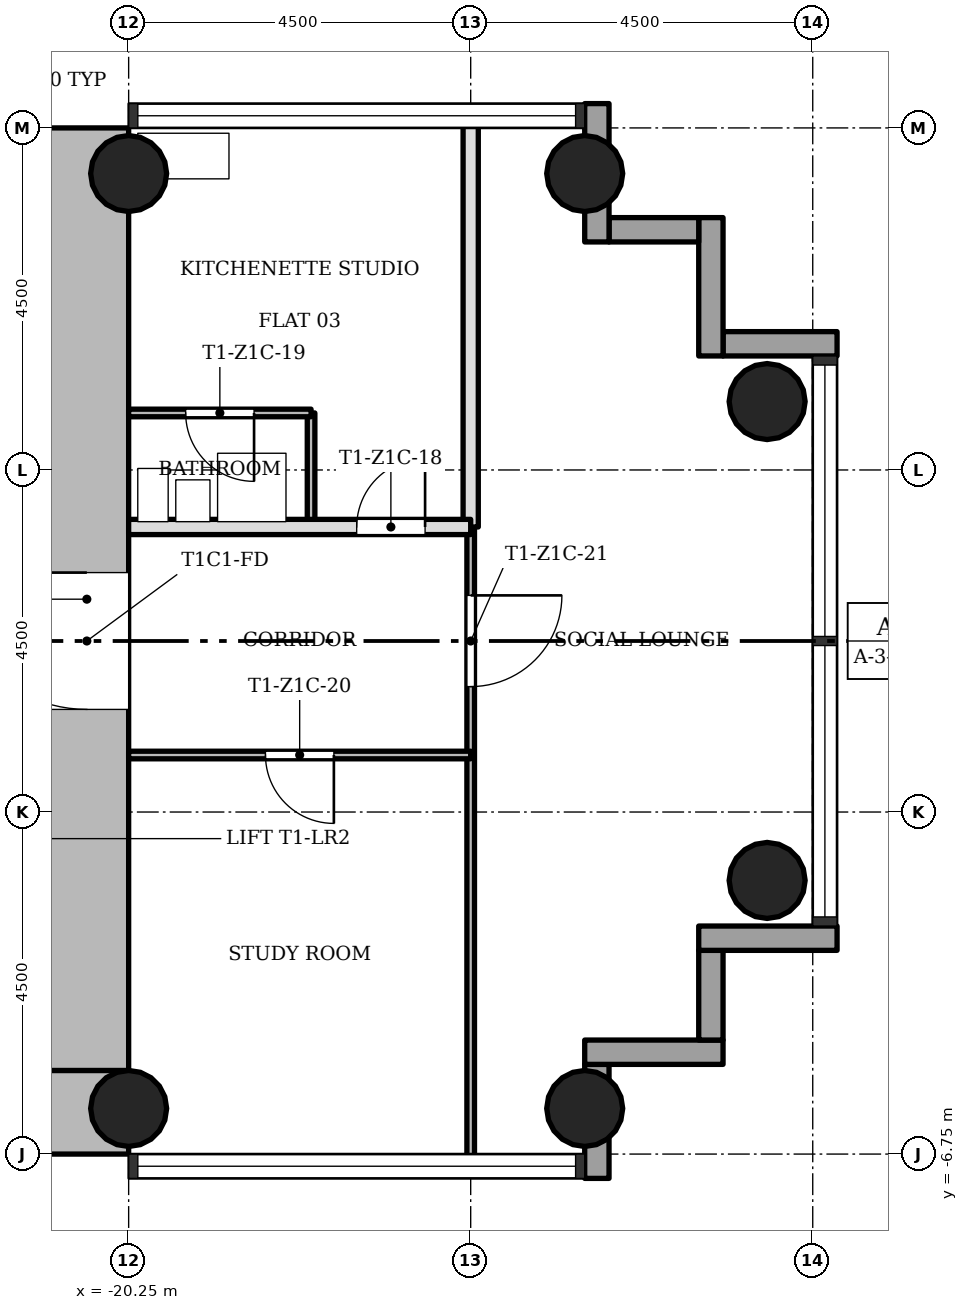
"""IFC4 building model, lengths in metres.
Left out: names, types, materials, properties, quantities, classifications, styles, units other than length and angle.
Written with IfcOpenShell. Run it as: python <this file> out.ifc"""

import sys

from ifc_helpers import new_model, si_unit, direction, frame, frame_2d, origin, origin_2d, place, context, subcontext, project, spatial, rectangle, hollow_circle, extrude, element, fill, save


model = new_model("IFC4")
c1 = context("Model", 3, precision=1e-05, world=origin(), true_north=direction((0.0, 1.0)))
c2 = subcontext(c1, "Body", "Model", "MODEL_VIEW")
j1 = project(units=[si_unit("LENGTHUNIT", "METRE"), si_unit("PLANEANGLEUNIT", "RADIAN")], contexts=[c1])
p1 = place(None, origin())
s1 = spatial("IfcSite", under=j1, at=p1, CompositionType="ELEMENT")
p2 = place(p1, origin())
s2 = spatial("IfcBuilding", under=s1, at=p2, CompositionType="ELEMENT")
p3 = place(p2, frame((0.0, 0.0, 48.3)))
s3 = spatial("IfcBuildingStorey", under=s2, at=p3, CompositionType="ELEMENT", Elevation=48.3)
p4 = place(p3, frame((-28.15, -6.2, 0.0), z_axis=(0.0, 0.0, 1.0), x_axis=(1.0, 0.0, 0.0)))
e1 = element("IfcWall", 1, at=p4, inside=s3, PredefinedType="SHEAR", context=c2, shape_type="SweptSolid", body=[
    extrude(rectangle(XDim=7.9, YDim=1.1, at=frame_2d((3.95, 0.0))), origin(), (0.0, 0.0, 1.0), 3.4),
])
p5 = place(p3, frame((-20.8, -5.65, 0.0), z_axis=(0.0, 0.0, 1.0), x_axis=(0.0, 1.0, 0.0)))
e2 = element("IfcWall", 2, at=p5, inside=s3, PredefinedType="SHEAR", context=c2, shape_type="SweptSolid", body=[
    extrude(rectangle(XDim=12.4, YDim=1.1, at=frame_2d((6.2, 0.0))), origin(), (0.0, 0.0, 1.0), 3.4),
])
p6 = place(p5, frame((4.75, 0.0, 0.0)))
e3 = element("IfcOpeningElement", 3, at=p6, cuts=e2, PredefinedType="OPENING", context=c2, shape_type="SweptSolid", body=[
    extrude(rectangle(XDim=1.8, YDim=2.1, at=frame_2d((0.9, 1.05))), frame((0.0, 0.56, 0.0), z_axis=(0.0, -1.0, 0.0), x_axis=(1.0, 0.0, 0.0)), (0.0, 0.0, 1.0), 1.12),
])
for number, where, z_axis, x_axis in (
    (4, (-20.25, -6.15, 0.0), (0.0, 0.0, 1.0), (1.0, 0.0, 0.0)),
    (5, (-20.25, 6.15, 0.0), (0.0, 0.0, 1.0), (1.0, 0.0, 0.0)),
    (6, (-14.25, -6.15, 0.0), (0.0, 0.0, 1.0), (1.0, 0.0, 0.0)),
    (7, (-14.25, 6.15, 0.0), (0.0, 0.0, 1.0), (1.0, 0.0, 0.0)),
    (8, (-11.85, -3.15, 0.0), (0.0, 0.0, 1.0), (1.0, 0.0, 0.0)),
    (9, (-11.85, 3.15, 0.0), (0.0, 0.0, 1.0), (1.0, 0.0, 0.0)),
):
    element("IfcColumn", number, at=place(p3, frame(where, z_axis=z_axis, x_axis=x_axis)), inside=s3, PredefinedType="COLUMN", context=c2, shape_type="SweptSolid", body=[
        extrude(hollow_circle(Radius=0.5, WallThickness=0.036, at=origin_2d()), origin(), (0.0, 0.0, 1.0), 3.4),
    ])
p7 = place(p3, frame((-14.09, -7.07, -0.3), z_axis=(0.0, 0.0, 1.0), x_axis=(0.0, 1.0, 0.0)))
e10 = element("IfcWall", 10, at=p7, inside=s3, PredefinedType="STANDARD", context=c2, shape_type="SweptSolid", body=[
    extrude(rectangle(XDim=1.5, YDim=0.32, at=frame_2d((0.75, 0.0))), origin(), (0.0, 0.0, 1.0), 3.4),
])
p8 = place(p3, frame((-14.25, -5.41, -0.3), z_axis=(0.0, 0.0, 1.0), x_axis=(1.0, 0.0, 0.0)))
e11 = element("IfcWall", 11, at=p8, inside=s3, PredefinedType="STANDARD", context=c2, shape_type="SweptSolid", body=[
    extrude(rectangle(XDim=1.82, YDim=0.32, at=frame_2d((0.91, 0.0))), origin(), (0.0, 0.0, 1.0), 3.4),
])
p9 = place(p3, frame((-12.59, -5.25, -0.3), z_axis=(0.0, 0.0, 1.0), x_axis=(0.0, 1.0, 0.0)))
e12 = element("IfcWall", 12, at=p9, inside=s3, PredefinedType="STANDARD", context=c2, shape_type="SweptSolid", body=[
    extrude(rectangle(XDim=1.18, YDim=0.32, at=frame_2d((0.59, 0.0))), origin(), (0.0, 0.0, 1.0), 3.4),
])
p10 = place(p3, frame((-12.75, -3.91, -0.3), z_axis=(0.0, 0.0, 1.0), x_axis=(1.0, 0.0, 0.0)))
e13 = element("IfcWall", 13, at=p10, inside=s3, PredefinedType="STANDARD", context=c2, shape_type="SweptSolid", body=[
    extrude(rectangle(XDim=1.82, YDim=0.32, at=frame_2d((0.91, 0.0))), origin(), (0.0, 0.0, 1.0), 3.4),
])
p11 = place(p3, frame((-10.93, 3.91, -0.3), z_axis=(0.0, 0.0, 1.0), x_axis=(-1.0, 0.0, 0.0)))
e14 = element("IfcWall", 14, at=p11, inside=s3, PredefinedType="STANDARD", context=c2, shape_type="SweptSolid", body=[
    extrude(rectangle(XDim=1.5, YDim=0.32, at=frame_2d((0.75, 0.0))), origin(), (0.0, 0.0, 1.0), 3.4),
])
p12 = place(p3, frame((-12.59, 3.75, -0.3), z_axis=(0.0, 0.0, 1.0), x_axis=(0.0, 1.0, 0.0)))
e15 = element("IfcWall", 15, at=p12, inside=s3, PredefinedType="STANDARD", context=c2, shape_type="SweptSolid", body=[
    extrude(rectangle(XDim=1.82, YDim=0.32, at=frame_2d((0.91, 0.0))), origin(), (0.0, 0.0, 1.0), 3.4),
])
p13 = place(p3, frame((-12.75, 5.41, -0.3), z_axis=(0.0, 0.0, 1.0), x_axis=(-1.0, 0.0, 0.0)))
e16 = element("IfcWall", 16, at=p13, inside=s3, PredefinedType="STANDARD", context=c2, shape_type="SweptSolid", body=[
    extrude(rectangle(XDim=1.18, YDim=0.32, at=frame_2d((0.59, 0.0))), origin(), (0.0, 0.0, 1.0), 3.4),
])
p14 = place(p3, frame((-14.09, 5.25, -0.3), z_axis=(0.0, 0.0, 1.0), x_axis=(0.0, 1.0, 0.0)))
e17 = element("IfcWall", 17, at=p14, inside=s3, PredefinedType="STANDARD", context=c2, shape_type="SweptSolid", body=[
    extrude(rectangle(XDim=1.82, YDim=0.32, at=frame_2d((0.91, 0.0))), origin(), (0.0, 0.0, 1.0), 3.4),
])
p15 = place(p3, frame((-17.85, 1.5, 0.0), z_axis=(0.0, 0.0, 1.0), x_axis=(0.0, 1.0, 0.0)))
e18 = element("IfcWall", 18, at=p15, inside=s3, PredefinedType="PARTITIONING", context=c2, shape_type="SweptSolid", body=[
    extrude(rectangle(XDim=1.5, YDim=0.1, at=frame_2d((0.75, 0.0))), origin(), (0.0, 0.0, 1.0), 3.0),
])
p16 = place(p3, frame((-15.75, -6.85, 0.0), z_axis=(0.0, 0.0, 1.0), x_axis=(0.0, 1.0, 0.0)))
e19 = element("IfcWall", 19, at=p16, inside=s3, PredefinedType="PARTITIONING", context=c2, shape_type="SweptSolid", body=[
    extrude(rectangle(XDim=8.35, YDim=0.1, at=frame_2d((4.175, 0.0))), origin(), (0.0, 0.0, 1.0), 3.0),
])
p17 = place(p16, frame((6.25, 0.0, 0.0)))
e20 = element("IfcOpeningElement", 20, at=p17, cuts=e19, PredefinedType="OPENING", context=c2, shape_type="SweptSolid", body=[
    extrude(rectangle(XDim=1.2, YDim=2.1, at=frame_2d((0.6, 1.05))), frame((0.0, 0.06, 0.0), z_axis=(0.0, -1.0, 0.0), x_axis=(1.0, 0.0, 0.0)), (0.0, 0.0, 1.0), 0.12),
])
p18 = place(p3, frame((-15.75, 1.5, 0.0), z_axis=(0.0, 0.0, 1.0), x_axis=(0.0, 1.0, 0.0)))
e21 = element("IfcWall", 21, at=p18, inside=s3, PredefinedType="SOLIDWALL", context=c2, shape_type="SweptSolid", body=[
    extrude(rectangle(XDim=5.35, YDim=0.2, at=frame_2d((2.675, 0.0))), origin(), (0.0, 0.0, 1.0), 3.0),
])
p19 = place(p3, frame((-20.25, -1.5, 0.0), z_axis=(0.0, 0.0, 1.0), x_axis=(1.0, 0.0, 0.0)))
e22 = element("IfcWall", 22, at=p19, inside=s3, PredefinedType="PARTITIONING", context=c2, shape_type="SweptSolid", body=[
    extrude(rectangle(XDim=4.5, YDim=0.1, at=frame_2d((2.25, 0.0))), origin(), (0.0, 0.0, 1.0), 3.0),
])
p20 = place(p19, frame((1.8, 0.0, 0.0)))
e23 = element("IfcOpeningElement", 23, at=p20, cuts=e22, PredefinedType="OPENING", context=c2, shape_type="SweptSolid", body=[
    extrude(rectangle(XDim=0.9, YDim=2.1, at=frame_2d((0.45, 1.05))), frame((0.0, 0.06, 0.0), z_axis=(0.0, -1.0, 0.0), x_axis=(1.0, 0.0, 0.0)), (0.0, 0.0, 1.0), 0.12),
])
p21 = place(p3, frame((-20.25, 1.5, 0.0), z_axis=(0.0, 0.0, 1.0), x_axis=(1.0, 0.0, 0.0)))
e24 = element("IfcWall", 24, at=p21, inside=s3, PredefinedType="SOLIDWALL", context=c2, shape_type="SweptSolid", body=[
    extrude(rectangle(XDim=4.5, YDim=0.2, at=frame_2d((2.25, 0.0))), origin(), (0.0, 0.0, 1.0), 3.0),
])
p22 = place(p21, frame((3.0, 0.0, 0.0)))
e25 = element("IfcOpeningElement", 25, at=p22, cuts=e24, PredefinedType="OPENING", context=c2, shape_type="SweptSolid", body=[
    extrude(rectangle(XDim=0.9, YDim=2.1, at=frame_2d((0.45, 1.05))), frame((0.0, 0.11, 0.0), z_axis=(0.0, -1.0, 0.0), x_axis=(1.0, 0.0, 0.0)), (0.0, 0.0, 1.0), 0.22),
])
p23 = place(p3, frame((-20.25, 3.0, 0.0), z_axis=(0.0, 0.0, 1.0), x_axis=(1.0, 0.0, 0.0)))
e26 = element("IfcWall", 26, at=p23, inside=s3, PredefinedType="PARTITIONING", context=c2, shape_type="SweptSolid", body=[
    extrude(rectangle(XDim=2.4, YDim=0.1, at=frame_2d((1.2, 0.0))), origin(), (0.0, 0.0, 1.0), 3.0),
])
p24 = place(p23, frame((0.75, 0.0, 0.0)))
e27 = element("IfcOpeningElement", 27, at=p24, cuts=e26, PredefinedType="OPENING", context=c2, shape_type="SweptSolid", body=[
    extrude(rectangle(XDim=0.9, YDim=2.1, at=frame_2d((0.45, 1.05))), frame((0.0, 0.06, 0.0), z_axis=(0.0, -1.0, 0.0), x_axis=(1.0, 0.0, 0.0)), (0.0, 0.0, 1.0), 0.12),
])
p25 = place(p22, origin())
e28 = element("IfcDoor", 28, at=p25, inside=s3, OperationType="SINGLE_SWING_LEFT", PredefinedType="DOOR", context=c2, shape_type="SweptSolid", body=[
    extrude(rectangle(XDim=0.9, YDim=2.1, at=frame_2d((0.45, 1.05))), frame((0.0, 0.025, 0.0), z_axis=(0.0, -1.0, 0.0), x_axis=(1.0, 0.0, 0.0)), (0.0, 0.0, 1.0), 0.05),
])
fill(e25, e28)
p26 = place(p24, origin())
e29 = element("IfcDoor", 29, at=p26, inside=s3, OperationType="SINGLE_SWING_RIGHT", PredefinedType="DOOR", context=c2, shape_type="SweptSolid", body=[
    extrude(rectangle(XDim=0.9, YDim=2.1, at=frame_2d((0.45, 1.05))), frame((0.0, 0.025, 0.0), z_axis=(0.0, -1.0, 0.0), x_axis=(1.0, 0.0, 0.0)), (0.0, 0.0, 1.0), 0.05),
])
fill(e27, e29)
p27 = place(p20, origin())
e30 = element("IfcDoor", 30, at=p27, inside=s3, OperationType="SINGLE_SWING_RIGHT", PredefinedType="DOOR", context=c2, shape_type="SweptSolid", body=[
    extrude(rectangle(XDim=0.9, YDim=2.1, at=frame_2d((0.45, 1.05))), frame((0.0, 0.025, 0.0), z_axis=(0.0, -1.0, 0.0), x_axis=(1.0, 0.0, 0.0)), (0.0, 0.0, 1.0), 0.05),
])
fill(e23, e30)
p28 = place(p17, origin())
e31 = element("IfcDoor", 31, at=p28, inside=s3, OperationType="SINGLE_SWING_RIGHT", PredefinedType="DOOR", context=c2, shape_type="SweptSolid", body=[
    extrude(rectangle(XDim=1.2, YDim=2.1, at=frame_2d((0.6, 1.05))), frame((0.0, 0.025, 0.0), z_axis=(0.0, -1.0, 0.0), x_axis=(1.0, 0.0, 0.0)), (0.0, 0.0, 1.0), 0.05),
])
fill(e20, e31)
p29 = place(p6, origin())
e32 = element("IfcDoor", 32, at=p29, inside=s3, OperationType="SINGLE_SWING_LEFT", PredefinedType="DOOR", context=c2, shape_type="SweptSolid", body=[
    extrude(rectangle(XDim=1.8, YDim=2.1, at=frame_2d((0.9, 1.05))), frame((0.0, 0.025, 0.0), z_axis=(0.0, -1.0, 0.0), x_axis=(1.0, 0.0, 0.0)), (0.0, 0.0, 1.0), 0.05),
])
fill(e3, e32)
save(model, sys.argv[1])
